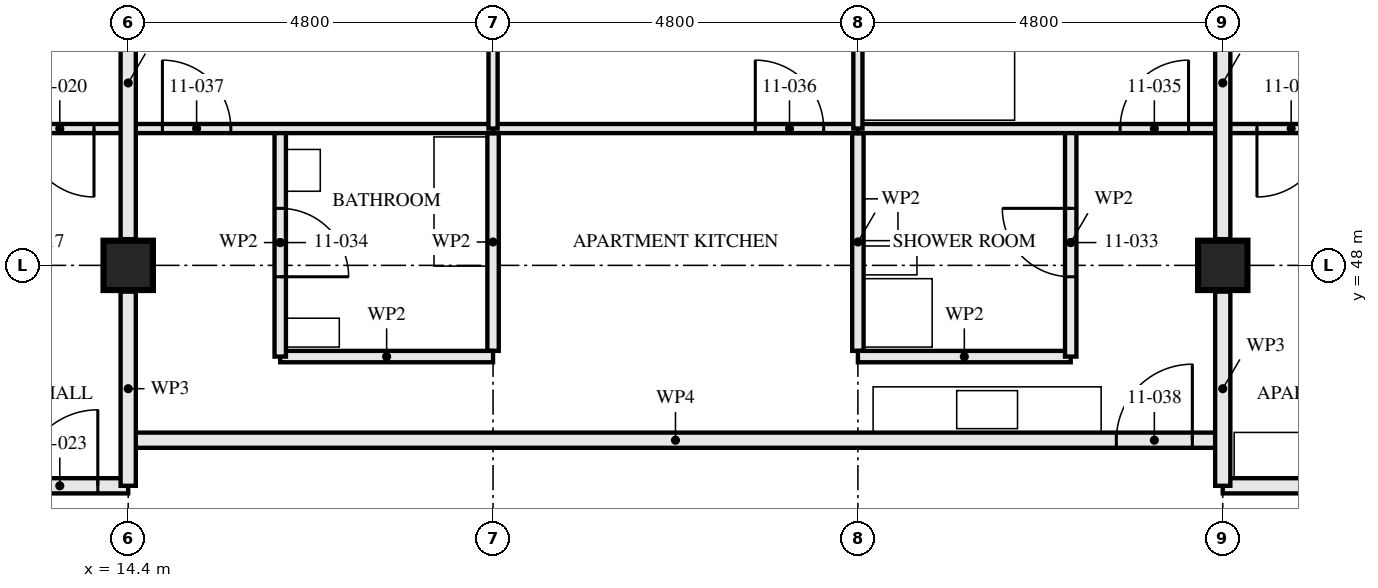
"""IFC4 building model, lengths in metres.
Left out: names, types, materials, properties, quantities, classifications, styles, units other than length and angle.
Written with IfcOpenShell. Run it as: python <this file> out.ifc"""

import sys

from ifc_helpers import new_model, si_unit, direction, frame, frame_2d, origin, origin_2d, place, context, subcontext, project, spatial, rectangle, hollow_rectangle, extrude, element, fill, save


model = new_model("IFC4")
c1 = context("Model", 3, precision=1e-05, world=origin(), true_north=direction((0.0, 1.0)))
c2 = subcontext(c1, "Body", "Model", "MODEL_VIEW")
j1 = project(units=[si_unit("LENGTHUNIT", "METRE"), si_unit("PLANEANGLEUNIT", "RADIAN")], contexts=[c1])
p1 = place(None, origin())
s1 = spatial("IfcSite", under=j1, at=p1, CompositionType="ELEMENT")
p2 = place(p1, origin())
s2 = spatial("IfcBuilding", under=s1, at=p2, CompositionType="ELEMENT")
p3 = place(p2, frame((0.0, 0.0, 44.5)))
s3 = spatial("IfcBuildingStorey", under=s2, at=p3, CompositionType="ELEMENT", Elevation=44.5)
for number, where, z_axis, x_axis in (
    (1, (14.4, 48.0, 0.0), (0.0, 0.0, 1.0), (1.0, 0.0, 0.0)),
    (2, (28.8, 48.0, 0.0), (0.0, 0.0, 1.0), (1.0, 0.0, 0.0)),
):
    element("IfcColumn", number, at=place(p3, frame(where, z_axis=z_axis, x_axis=x_axis)), inside=s3, PredefinedType="COLUMN", context=c2, shape_type="SweptSolid", body=[
        extrude(hollow_rectangle(XDim=0.65, YDim=0.65, WallThickness=0.05, at=origin_2d()), origin(), (0.0, 0.0, 1.0), 3.5),
    ])
p4 = place(p3, frame((14.4, 49.8, 0.0), z_axis=(0.0, 0.0, 1.0), x_axis=(-1.0, 0.0, 0.0)))
e3 = element("IfcWall", 3, at=p4, inside=s3, PredefinedType="PARTITIONING", context=c2, shape_type="SweptSolid", body=[
    extrude(rectangle(XDim=4.8, YDim=0.12, at=frame_2d((2.4, 0.0))), origin(), (0.0, 0.0, 1.0), 3.33),
])
p5 = place(p4, frame((0.45, 0.0, 0.0)))
e4 = element("IfcOpeningElement", 4, at=p5, cuts=e3, PredefinedType="OPENING", context=c2, shape_type="SweptSolid", body=[
    extrude(rectangle(XDim=0.9, YDim=2.1, at=frame_2d((0.45, 1.05))), frame((0.0, 0.071, 0.0), z_axis=(0.0, -1.0, 0.0), x_axis=(1.0, 0.0, 0.0)), (0.0, 0.0, 1.0), 0.141),
])
p6 = place(p3, frame((14.4, 45.1, 0.0), z_axis=(0.0, 0.0, 1.0), x_axis=(-1.0, 0.0, 0.0)))
e5 = element("IfcWall", 5, at=p6, inside=s3, PredefinedType="PARTITIONING", context=c2, shape_type="SweptSolid", body=[
    extrude(rectangle(XDim=9.6, YDim=0.2, at=frame_2d((4.8, 0.0))), origin(), (0.0, 0.0, 1.0), 3.33),
])
p7 = place(p6, frame((0.4, 0.0, 0.0)))
e6 = element("IfcOpeningElement", 6, at=p7, cuts=e5, PredefinedType="OPENING", context=c2, shape_type="SweptSolid", body=[
    extrude(rectangle(XDim=1.0, YDim=2.1, at=frame_2d((0.5, 1.05))), frame((0.0, 0.111, 0.0), z_axis=(0.0, -1.0, 0.0), x_axis=(1.0, 0.0, 0.0)), (0.0, 0.0, 1.0), 0.221),
])
p8 = place(p3, frame((26.8, 49.8, 0.0), z_axis=(0.0, 0.0, 1.0), x_axis=(0.0, -1.0, 0.0)))
e7 = element("IfcWall", 7, at=p8, inside=s3, PredefinedType="PARTITIONING", context=c2, shape_type="SweptSolid", body=[
    extrude(rectangle(XDim=3.0, YDim=0.15, at=frame_2d((1.5, 0.0))), origin(), (0.0, 0.0, 1.0), 2.55),
])
p9 = place(p8, frame((1.05, 0.0, 0.0)))
e8 = element("IfcOpeningElement", 8, at=p9, cuts=e7, PredefinedType="OPENING", context=c2, shape_type="SweptSolid", body=[
    extrude(rectangle(XDim=0.9, YDim=2.1, at=frame_2d((0.45, 1.05))), frame((0.0, 0.085, 0.0), z_axis=(0.0, -1.0, 0.0), x_axis=(1.0, 0.0, 0.0)), (0.0, 0.0, 1.0), 0.171),
])
p10 = place(p3, frame((26.8, 46.8, 0.0), z_axis=(0.0, 0.0, 1.0), x_axis=(-1.0, 0.0, 0.0)))
e9 = element("IfcWall", 9, at=p10, inside=s3, PredefinedType="PARTITIONING", context=c2, shape_type="SweptSolid", body=[
    extrude(rectangle(XDim=2.8, YDim=0.15, at=frame_2d((1.4, 0.0))), origin(), (0.0, 0.0, 1.0), 3.33),
])
p11 = place(p3, frame((16.4, 49.8, 0.0), z_axis=(0.0, 0.0, 1.0), x_axis=(0.0, -1.0, 0.0)))
e10 = element("IfcWall", 10, at=p11, inside=s3, PredefinedType="PARTITIONING", context=c2, shape_type="SweptSolid", body=[
    extrude(rectangle(XDim=3.0, YDim=0.15, at=frame_2d((1.5, 0.0))), origin(), (0.0, 0.0, 1.0), 2.55),
])
p12 = place(p11, frame((1.05, 0.0, 0.0)))
e11 = element("IfcOpeningElement", 11, at=p12, cuts=e10, PredefinedType="OPENING", context=c2, shape_type="SweptSolid", body=[
    extrude(rectangle(XDim=0.9, YDim=2.1, at=frame_2d((0.45, 1.05))), frame((0.0, 0.085, 0.0), z_axis=(0.0, -1.0, 0.0), x_axis=(1.0, 0.0, 0.0)), (0.0, 0.0, 1.0), 0.171),
])
p13 = place(p3, frame((19.2, 46.8, 0.0), z_axis=(0.0, 0.0, 1.0), x_axis=(-1.0, 0.0, 0.0)))
e12 = element("IfcWall", 12, at=p13, inside=s3, PredefinedType="PARTITIONING", context=c2, shape_type="SweptSolid", body=[
    extrude(rectangle(XDim=2.8, YDim=0.15, at=frame_2d((1.4, 0.0))), origin(), (0.0, 0.0, 1.0), 3.33),
])
p14 = place(p3, frame((28.8, 49.8, 0.0), z_axis=(0.0, 0.0, 1.0), x_axis=(-1.0, 0.0, 0.0)))
e13 = element("IfcWall", 13, at=p14, inside=s3, PredefinedType="PARTITIONING", context=c2, shape_type="SweptSolid", body=[
    extrude(rectangle(XDim=4.8, YDim=0.12, at=frame_2d((2.4, 0.0))), origin(), (0.0, 0.0, 1.0), 3.33),
])
p15 = place(p14, frame((0.45, 0.0, 0.0)))
e14 = element("IfcOpeningElement", 14, at=p15, cuts=e13, PredefinedType="OPENING", context=c2, shape_type="SweptSolid", body=[
    extrude(rectangle(XDim=0.9, YDim=2.1, at=frame_2d((0.45, 1.05))), frame((0.0, 0.071, 0.0), z_axis=(0.0, -1.0, 0.0), x_axis=(1.0, 0.0, 0.0)), (0.0, 0.0, 1.0), 0.141),
])
p16 = place(p3, frame((24.0, 49.8, 0.0), z_axis=(0.0, 0.0, 1.0), x_axis=(-1.0, 0.0, 0.0)))
e15 = element("IfcWall", 15, at=p16, inside=s3, PredefinedType="PARTITIONING", context=c2, shape_type="SweptSolid", body=[
    extrude(rectangle(XDim=4.8, YDim=0.12, at=frame_2d((2.4, 0.0))), origin(), (0.0, 0.0, 1.0), 3.33),
])
p17 = place(p16, frame((0.45, 0.0, 0.0)))
e16 = element("IfcOpeningElement", 16, at=p17, cuts=e15, PredefinedType="OPENING", context=c2, shape_type="SweptSolid", body=[
    extrude(rectangle(XDim=0.9, YDim=2.1, at=frame_2d((0.45, 1.05))), frame((0.0, 0.071, 0.0), z_axis=(0.0, -1.0, 0.0), x_axis=(1.0, 0.0, 0.0)), (0.0, 0.0, 1.0), 0.141),
])
p18 = place(p3, frame((19.2, 49.8, 0.0), z_axis=(0.0, 0.0, 1.0), x_axis=(-1.0, 0.0, 0.0)))
e17 = element("IfcWall", 17, at=p18, inside=s3, PredefinedType="PARTITIONING", context=c2, shape_type="SweptSolid", body=[
    extrude(rectangle(XDim=4.8, YDim=0.12, at=frame_2d((2.4, 0.0))), origin(), (0.0, 0.0, 1.0), 3.33),
])
p19 = place(p18, frame((3.45, 0.0, 0.0)))
e18 = element("IfcOpeningElement", 18, at=p19, cuts=e17, PredefinedType="OPENING", context=c2, shape_type="SweptSolid", body=[
    extrude(rectangle(XDim=0.9, YDim=2.1, at=frame_2d((0.45, 1.05))), frame((0.0, 0.071, 0.0), z_axis=(0.0, -1.0, 0.0), x_axis=(1.0, 0.0, 0.0)), (0.0, 0.0, 1.0), 0.141),
])
for number, where, z_axis, x_axis in (
    (19, (24.0, 57.255, 0.0), (0.0, 0.0, 1.0), (0.0, -1.0, 0.0)),
    (20, (19.2, 57.255, 0.0), (0.0, 0.0, 1.0), (0.0, -1.0, 0.0)),
):
    element("IfcWall", number, at=place(p3, frame(where, z_axis=z_axis, x_axis=x_axis)), inside=s3, PredefinedType="PARTITIONING", context=c2, shape_type="SweptSolid", body=[
        extrude(rectangle(XDim=7.455, YDim=0.12, at=frame_2d((3.728, 0.0))), origin(), (0.0, 0.0, 1.0), 2.55),
    ])
p20 = place(p3, frame((28.8, 45.7, 0.0), z_axis=(0.0, 0.0, 1.0), x_axis=(-1.0, 0.0, 0.0)))
e21 = element("IfcWall", 21, at=p20, inside=s3, PredefinedType="PARTITIONING", context=c2, shape_type="SweptSolid", body=[
    extrude(rectangle(XDim=14.4, YDim=0.2, at=frame_2d((7.2, 0.0))), origin(), (0.0, 0.0, 1.0), 3.33),
])
p21 = place(p20, frame((0.4, 0.0, 0.0)))
e22 = element("IfcOpeningElement", 22, at=p21, cuts=e21, PredefinedType="OPENING", context=c2, shape_type="SweptSolid", body=[
    extrude(rectangle(XDim=1.0, YDim=2.1, at=frame_2d((0.5, 1.05))), frame((0.0, 0.111, 0.0), z_axis=(0.0, -1.0, 0.0), x_axis=(1.0, 0.0, 0.0)), (0.0, 0.0, 1.0), 0.221),
])
p22 = place(p3, frame((33.6, 49.8, 0.0), z_axis=(0.0, 0.0, 1.0), x_axis=(-1.0, 0.0, 0.0)))
e23 = element("IfcWall", 23, at=p22, inside=s3, PredefinedType="PARTITIONING", context=c2, shape_type="SweptSolid", body=[
    extrude(rectangle(XDim=4.8, YDim=0.12, at=frame_2d((2.4, 0.0))), origin(), (0.0, 0.0, 1.0), 3.33),
])
p23 = place(p22, frame((3.45, 0.0, 0.0)))
e24 = element("IfcOpeningElement", 24, at=p23, cuts=e23, PredefinedType="OPENING", context=c2, shape_type="SweptSolid", body=[
    extrude(rectangle(XDim=0.9, YDim=2.1, at=frame_2d((0.45, 1.05))), frame((0.0, 0.071, 0.0), z_axis=(0.0, -1.0, 0.0), x_axis=(1.0, 0.0, 0.0)), (0.0, 0.0, 1.0), 0.141),
])
p24 = place(p3, frame((38.4, 45.1, 0.0), z_axis=(0.0, 0.0, 1.0), x_axis=(-1.0, 0.0, 0.0)))
e25 = element("IfcWall", 25, at=p24, inside=s3, PredefinedType="PARTITIONING", context=c2, shape_type="SweptSolid", body=[
    extrude(rectangle(XDim=9.6, YDim=0.2, at=frame_2d((4.8, 0.0))), origin(), (0.0, 0.0, 1.0), 3.33),
])
p25 = place(p24, frame((0.4, 0.0, 0.0)))
e26 = element("IfcOpeningElement", 26, at=p25, cuts=e25, PredefinedType="OPENING", context=c2, shape_type="SweptSolid", body=[
    extrude(rectangle(XDim=1.0, YDim=2.1, at=frame_2d((0.5, 1.05))), frame((0.0, 0.111, 0.0), z_axis=(0.0, -1.0, 0.0), x_axis=(1.0, 0.0, 0.0)), (0.0, 0.0, 1.0), 0.221),
])
p26 = place(p24, frame((5.2, 0.0, 0.0)))
e27 = element("IfcOpeningElement", 27, at=p26, cuts=e25, PredefinedType="OPENING", context=c2, shape_type="SweptSolid", body=[
    extrude(rectangle(XDim=1.0, YDim=2.1, at=frame_2d((0.5, 1.05))), frame((0.0, 0.111, 0.0), z_axis=(0.0, -1.0, 0.0), x_axis=(1.0, 0.0, 0.0)), (0.0, 0.0, 1.0), 0.221),
])
p27 = place(p3, frame((14.4, 45.1, 0.0), z_axis=(0.0, 0.0, 1.0), x_axis=(0.0, 1.0, 0.0)))
e28 = element("IfcWall", 28, at=p27, inside=s3, PredefinedType="PARTITIONING", context=c2, shape_type="SweptSolid", body=[
    extrude(rectangle(XDim=2.555, YDim=0.2, at=frame_2d((1.277, 0.0))), origin(), (0.0, 0.0, 1.0), 2.32),
])
p28 = place(p3, frame((14.4, 48.345, 0.0), z_axis=(0.0, 0.0, 1.0), x_axis=(0.0, 1.0, 0.0)))
e29 = element("IfcWall", 29, at=p28, inside=s3, PredefinedType="PARTITIONING", context=c2, shape_type="SweptSolid", body=[
    extrude(rectangle(XDim=4.11, YDim=0.2, at=frame_2d((2.055, 0.0))), origin(), (0.0, 0.0, 1.0), 2.32),
])
p29 = place(p3, frame((28.8, 45.1, 0.0), z_axis=(0.0, 0.0, 1.0), x_axis=(0.0, 1.0, 0.0)))
e30 = element("IfcWall", 30, at=p29, inside=s3, PredefinedType="PARTITIONING", context=c2, shape_type="SweptSolid", body=[
    extrude(rectangle(XDim=2.555, YDim=0.2, at=frame_2d((1.277, 0.0))), origin(), (0.0, 0.0, 1.0), 2.32),
])
p30 = place(p3, frame((28.8, 48.345, 0.0), z_axis=(0.0, 0.0, 1.0), x_axis=(0.0, 1.0, 0.0)))
e31 = element("IfcWall", 31, at=p30, inside=s3, PredefinedType="PARTITIONING", context=c2, shape_type="SweptSolid", body=[
    extrude(rectangle(XDim=4.11, YDim=0.2, at=frame_2d((2.055, 0.0))), origin(), (0.0, 0.0, 1.0), 2.32),
])
for number, where, z_axis, x_axis in (
    (32, (24.0, 46.875, 0.0), (0.0, 0.0, 1.0), (0.0, 1.0, 0.0)),
    (33, (19.2, 49.74, 0.0), (0.0, 0.0, 1.0), (0.0, -1.0, 0.0)),
):
    element("IfcWall", number, at=place(p3, frame(where, z_axis=z_axis, x_axis=x_axis)), inside=s3, PredefinedType="PARTITIONING", context=c2, shape_type="SweptSolid", body=[
        extrude(rectangle(XDim=2.865, YDim=0.15, at=frame_2d((1.433, 0.0))), origin(), (0.0, 0.0, 1.0), 2.55),
    ])
p31 = place(p5, origin())
e34 = element("IfcDoor", 34, at=p31, inside=s3, OperationType="SINGLE_SWING_RIGHT", PredefinedType="DOOR", context=c2, shape_type="SweptSolid", body=[
    extrude(rectangle(XDim=0.9, YDim=2.1, at=frame_2d((0.45, 1.05))), frame((0.0, 0.022, 0.0), z_axis=(0.0, -1.0, 0.0), x_axis=(1.0, 0.0, 0.0)), (0.0, 0.0, 1.0), 0.044),
])
fill(e4, e34)
p32 = place(p7, frame((1.0, 0.0, 0.0), z_axis=(0.0, 0.0, 1.0), x_axis=(-1.0, 0.0, 0.0)))
e35 = element("IfcDoor", 35, at=p32, inside=s3, OperationType="SINGLE_SWING_LEFT", PredefinedType="DOOR", context=c2, shape_type="SweptSolid", body=[
    extrude(rectangle(XDim=1.0, YDim=2.1, at=frame_2d((0.5, 1.05))), frame((0.0, 0.027, 0.0), z_axis=(0.0, -1.0, 0.0), x_axis=(1.0, 0.0, 0.0)), (0.0, 0.0, 1.0), 0.054),
])
fill(e6, e35)
p33 = place(p9, frame((0.9, 0.0, 0.0), z_axis=(0.0, 0.0, 1.0), x_axis=(-1.0, 0.0, 0.0)))
e36 = element("IfcDoor", 36, at=p33, inside=s3, OperationType="SINGLE_SWING_LEFT", PredefinedType="DOOR", context=c2, shape_type="SweptSolid", body=[
    extrude(rectangle(XDim=0.9, YDim=2.1, at=frame_2d((0.45, 1.05))), frame((0.0, 0.022, 0.0), z_axis=(0.0, -1.0, 0.0), x_axis=(1.0, 0.0, 0.0)), (0.0, 0.0, 1.0), 0.044),
])
fill(e8, e36)
p34 = place(p12, origin())
e37 = element("IfcDoor", 37, at=p34, inside=s3, OperationType="SINGLE_SWING_LEFT", PredefinedType="DOOR", context=c2, shape_type="SweptSolid", body=[
    extrude(rectangle(XDim=0.9, YDim=2.1, at=frame_2d((0.45, 1.05))), frame((0.0, 0.022, 0.0), z_axis=(0.0, -1.0, 0.0), x_axis=(1.0, 0.0, 0.0)), (0.0, 0.0, 1.0), 0.044),
])
fill(e11, e37)
p35 = place(p15, frame((0.9, 0.0, 0.0), z_axis=(0.0, 0.0, 1.0), x_axis=(-1.0, 0.0, 0.0)))
e38 = element("IfcDoor", 38, at=p35, inside=s3, OperationType="SINGLE_SWING_LEFT", PredefinedType="DOOR", context=c2, shape_type="SweptSolid", body=[
    extrude(rectangle(XDim=0.9, YDim=2.1, at=frame_2d((0.45, 1.05))), frame((0.0, 0.022, 0.0), z_axis=(0.0, -1.0, 0.0), x_axis=(1.0, 0.0, 0.0)), (0.0, 0.0, 1.0), 0.044),
])
fill(e14, e38)
p36 = place(p17, frame((0.9, 0.0, 0.0), z_axis=(0.0, 0.0, 1.0), x_axis=(-1.0, 0.0, 0.0)))
e39 = element("IfcDoor", 39, at=p36, inside=s3, OperationType="SINGLE_SWING_RIGHT", PredefinedType="DOOR", context=c2, shape_type="SweptSolid", body=[
    extrude(rectangle(XDim=0.9, YDim=2.1, at=frame_2d((0.45, 1.05))), frame((0.0, 0.022, 0.0), z_axis=(0.0, -1.0, 0.0), x_axis=(1.0, 0.0, 0.0)), (0.0, 0.0, 1.0), 0.044),
])
fill(e16, e39)
p37 = place(p19, frame((0.9, 0.0, 0.0), z_axis=(0.0, 0.0, 1.0), x_axis=(-1.0, 0.0, 0.0)))
e40 = element("IfcDoor", 40, at=p37, inside=s3, OperationType="SINGLE_SWING_RIGHT", PredefinedType="DOOR", context=c2, shape_type="SweptSolid", body=[
    extrude(rectangle(XDim=0.9, YDim=2.1, at=frame_2d((0.45, 1.05))), frame((0.0, 0.022, 0.0), z_axis=(0.0, -1.0, 0.0), x_axis=(1.0, 0.0, 0.0)), (0.0, 0.0, 1.0), 0.044),
])
fill(e18, e40)
p38 = place(p21, frame((1.0, 0.0, 0.0), z_axis=(0.0, 0.0, 1.0), x_axis=(-1.0, 0.0, 0.0)))
e41 = element("IfcDoor", 41, at=p38, inside=s3, OperationType="SINGLE_SWING_LEFT", PredefinedType="DOOR", context=c2, shape_type="SweptSolid", body=[
    extrude(rectangle(XDim=1.0, YDim=2.1, at=frame_2d((0.5, 1.05))), frame((0.0, 0.027, 0.0), z_axis=(0.0, -1.0, 0.0), x_axis=(1.0, 0.0, 0.0)), (0.0, 0.0, 1.0), 0.054),
])
fill(e22, e41)
p39 = place(p23, origin())
e42 = element("IfcDoor", 42, at=p39, inside=s3, OperationType="SINGLE_SWING_LEFT", PredefinedType="DOOR", context=c2, shape_type="SweptSolid", body=[
    extrude(rectangle(XDim=0.9, YDim=2.1, at=frame_2d((0.45, 1.05))), frame((0.0, 0.022, 0.0), z_axis=(0.0, -1.0, 0.0), x_axis=(1.0, 0.0, 0.0)), (0.0, 0.0, 1.0), 0.044),
])
fill(e24, e42)
save(model, sys.argv[1])
